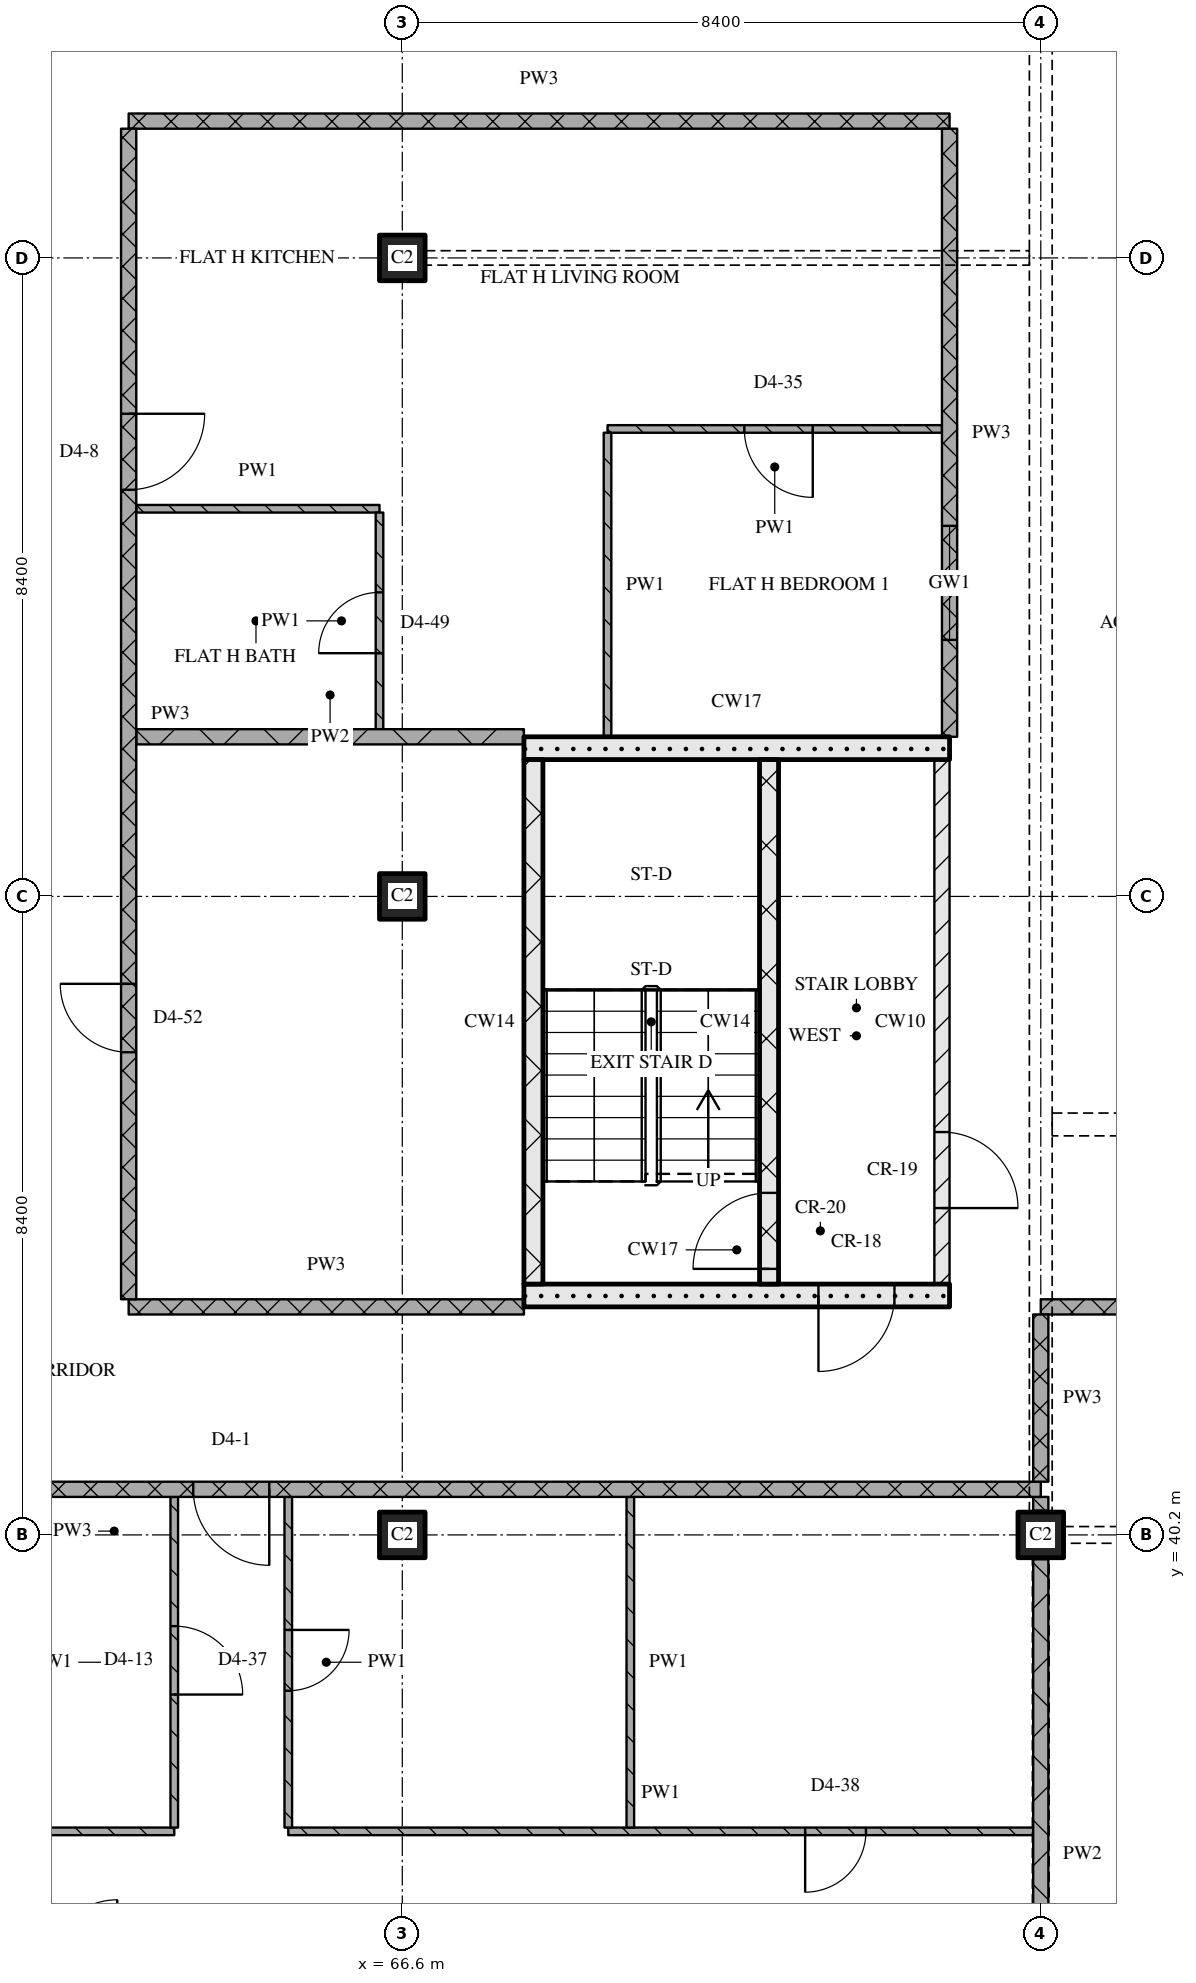
"""IFC4 building model, lengths in metres.
Left out: names, types, materials, properties, quantities, classifications, styles, units other than length and angle.
Written with IfcOpenShell. Run it as: python <this file> out.ifc"""

import sys

from ifc_helpers import new_model, si_unit, direction, frame, frame_2d, origin, origin_2d, place, context, subcontext, project, spatial, rectangle, extrude, element, fill, save


model = new_model("IFC4")
c1 = context("Model", 3, precision=1e-05, world=origin(), true_north=direction((0.0, 1.0)))
c2 = subcontext(c1, "Body", "Model", "MODEL_VIEW")
j1 = project(units=[si_unit("LENGTHUNIT", "METRE"), si_unit("PLANEANGLEUNIT", "RADIAN")], contexts=[c1])
p1 = place(None, origin())
s1 = spatial("IfcSite", under=j1, at=p1, CompositionType="ELEMENT")
p2 = place(p1, origin())
s2 = spatial("IfcBuilding", under=s1, at=p2, CompositionType="ELEMENT")
p3 = place(p2, frame((0.0, 0.0, 237.9)))
s3 = spatial("IfcBuildingStorey", under=s2, at=p3, CompositionType="ELEMENT", Elevation=237.9)
for number, where, z_axis, x_axis in (
    (1, (66.6, 40.2, 0.0), (0.0, 0.0, 1.0), (1.0, 0.0, 0.0)),
    (2, (66.6, 48.6, 0.0), (0.0, 0.0, 1.0), (1.0, 0.0, 0.0)),
    (3, (66.6, 57.0, 0.0), (0.0, 0.0, 1.0), (1.0, 0.0, 0.0)),
    (4, (75.0, 40.2, 0.0), (0.0, 0.0, 1.0), (1.0, 0.0, 0.0)),
):
    element("IfcColumn", number, at=place(p3, frame(where, z_axis=z_axis, x_axis=x_axis)), inside=s3, PredefinedType="COLUMN", context=c2, shape_type="SweptSolid", body=[
        extrude(rectangle(XDim=0.6, YDim=0.6, at=origin_2d()), origin(), (0.0, 0.0, 1.0), 3.6),
    ])
p4 = place(p3, frame((68.2, 43.35, 0.0), z_axis=(0.0, 0.0, 1.0), x_axis=(1.0, 0.0, 0.0)))
e5 = element("IfcWall", 5, at=p4, inside=s3, PredefinedType="SOLIDWALL", context=c2, shape_type="SweptSolid", body=[
    extrude(rectangle(XDim=5.6, YDim=0.3, at=frame_2d((2.8, 0.0))), origin(), (0.0, 0.0, 1.0), 3.32),
])
p5 = place(p4, frame((3.875, 0.0, 0.0)))
e6 = element("IfcOpeningElement", 6, at=p5, cuts=e5, PredefinedType="OPENING", context=c2, shape_type="SweptSolid", body=[
    extrude(rectangle(XDim=1.0, YDim=2.1, at=frame_2d((0.5, 1.05))), frame((0.0, 0.16, 0.0), z_axis=(0.0, -1.0, 0.0), x_axis=(1.0, 0.0, 0.0)), (0.0, 0.0, 1.0), 0.32),
])
p6 = place(p3, frame((68.325, 43.5, 0.0), z_axis=(0.0, 0.0, 1.0), x_axis=(0.0, 1.0, 0.0)))
e7 = element("IfcWall", 7, at=p6, inside=s3, PredefinedType="SOLIDWALL", context=c2, shape_type="SweptSolid", body=[
    extrude(rectangle(XDim=6.9, YDim=0.25, at=frame_2d((3.45, 0.0))), origin(), (0.0, 0.0, 1.0), 3.32),
])
p7 = place(p3, frame((71.425, 43.5, 0.0), z_axis=(0.0, 0.0, 1.0), x_axis=(0.0, 1.0, 0.0)))
e8 = element("IfcWall", 8, at=p7, inside=s3, PredefinedType="SOLIDWALL", context=c2, shape_type="SweptSolid", body=[
    extrude(rectangle(XDim=6.9, YDim=0.25, at=frame_2d((3.45, 0.0))), origin(), (0.0, 0.0, 1.0), 3.32),
])
p8 = place(p7, frame((0.2, 0.0, 0.0)))
e9 = element("IfcOpeningElement", 9, at=p8, cuts=e8, PredefinedType="OPENING", context=c2, shape_type="SweptSolid", body=[
    extrude(rectangle(XDim=1.0, YDim=2.1, at=frame_2d((0.5, 1.05))), frame((0.0, 0.135, 0.0), z_axis=(0.0, -1.0, 0.0), x_axis=(1.0, 0.0, 0.0)), (0.0, 0.0, 1.0), 0.27),
])
p9 = place(p3, frame((73.7, 43.5, 0.0), z_axis=(0.0, 0.0, 1.0), x_axis=(0.0, 1.0, 0.0)))
e10 = element("IfcWall", 10, at=p9, inside=s3, PredefinedType="PARTITIONING", context=c2, shape_type="SweptSolid", body=[
    extrude(rectangle(XDim=6.9, YDim=0.2, at=frame_2d((3.45, 0.0))), origin(), (0.0, 0.0, 1.0), 3.32),
])
p10 = place(p9, frame((1.0, 0.0, 0.0)))
e11 = element("IfcOpeningElement", 11, at=p10, cuts=e10, PredefinedType="OPENING", context=c2, shape_type="SweptSolid", body=[
    extrude(rectangle(XDim=1.0, YDim=2.1, at=frame_2d((0.5, 1.05))), frame((0.0, 0.11, 0.0), z_axis=(0.0, -1.0, 0.0), x_axis=(1.0, 0.0, 0.0)), (0.0, 0.0, 1.0), 0.22),
])
p11 = place(p3, frame((68.2, 50.55, 0.0), z_axis=(0.0, 0.0, 1.0), x_axis=(1.0, 0.0, 0.0)))
e12 = element("IfcWall", 12, at=p11, inside=s3, PredefinedType="SOLIDWALL", context=c2, shape_type="SweptSolid", body=[
    extrude(rectangle(XDim=5.6, YDim=0.3, at=frame_2d((2.8, 0.0))), origin(), (0.0, 0.0, 1.0), 3.32),
])
p12 = place(p3, frame((55.5, 36.3, 0.0), z_axis=(0.0, 0.0, 1.0), x_axis=(1.0, 0.0, 0.0)))
e13 = element("IfcWall", 13, at=p12, inside=s3, PredefinedType="PARTITIONING", context=c2, shape_type="SweptSolid", body=[
    extrude(rectangle(XDim=8.1, YDim=0.1, at=frame_2d((4.05, 0.0))), origin(), (0.0, 0.0, 1.0), 3.32),
])
p13 = place(p3, frame((65.1, 36.3, 0.0), z_axis=(0.0, 0.0, 1.0), x_axis=(1.0, 0.0, 0.0)))
e14 = element("IfcWall", 14, at=p13, inside=s3, PredefinedType="PARTITIONING", context=c2, shape_type="SweptSolid", body=[
    extrude(rectangle(XDim=9.8, YDim=0.1, at=frame_2d((4.9, 0.0))), origin(), (0.0, 0.0, 1.0), 3.32),
])
p14 = place(p13, frame((6.8, 0.0, 0.0)))
e15 = element("IfcOpeningElement", 15, at=p14, cuts=e14, PredefinedType="OPENING", context=c2, shape_type="SweptSolid", body=[
    extrude(rectangle(XDim=0.8, YDim=2.1, at=frame_2d((0.4, 1.05))), frame((0.0, 0.06, 0.0), z_axis=(0.0, -1.0, 0.0), x_axis=(1.0, 0.0, 0.0)), (0.0, 0.0, 1.0), 0.12),
])
p15 = place(p3, frame((75.0, 40.8, 0.0), z_axis=(0.0, 0.0, 1.0), x_axis=(-1.0, 0.0, 0.0)))
e16 = element("IfcWall", 16, at=p15, inside=s3, PredefinedType="PARTITIONING", context=c2, shape_type="SweptSolid", body=[
    extrude(rectangle(XDim=24.38, YDim=0.2, at=frame_2d((12.19, 0.0))), origin(), (0.0, 0.0, 1.0), 3.32),
])
p16 = place(p15, frame((10.15, 0.0, 0.0)))
e17 = element("IfcOpeningElement", 17, at=p16, cuts=e16, PredefinedType="OPENING", context=c2, shape_type="SweptSolid", body=[
    extrude(rectangle(XDim=1.0, YDim=2.1, at=frame_2d((0.5, 1.05))), frame((0.0, 0.11, 0.0), z_axis=(0.0, -1.0, 0.0), x_axis=(1.0, 0.0, 0.0)), (0.0, 0.0, 1.0), 0.22),
])
p17 = place(p3, frame((63.0, 43.2, 0.0), z_axis=(0.0, 0.0, 1.0), x_axis=(1.0, 0.0, 0.0)))
e18 = element("IfcWall", 18, at=p17, inside=s3, PredefinedType="PARTITIONING", context=c2, shape_type="SweptSolid", body=[
    extrude(rectangle(XDim=5.2, YDim=0.2, at=frame_2d((2.6, 0.0))), origin(), (0.0, 0.0, 1.0), 3.32),
])
p18 = place(p3, frame((100.2, 43.2, 0.0), z_axis=(0.0, 0.0, 1.0), x_axis=(-1.0, 0.0, 0.0)))
e19 = element("IfcWall", 19, at=p18, inside=s3, PredefinedType="PARTITIONING", context=c2, shape_type="SweptSolid", body=[
    extrude(rectangle(XDim=25.2, YDim=0.2, at=frame_2d((12.6, 0.0))), origin(), (0.0, 0.0, 1.0), 3.32),
])
p19 = place(p18, frame((9.25, 0.0, 0.0)))
e20 = element("IfcOpeningElement", 20, at=p19, cuts=e19, PredefinedType="OPENING", context=c2, shape_type="SweptSolid", body=[
    extrude(rectangle(XDim=1.0, YDim=2.1, at=frame_2d((0.5, 1.05))), frame((0.0, 0.11, 0.0), z_axis=(0.0, -1.0, 0.0), x_axis=(1.0, 0.0, 0.0)), (0.0, 0.0, 1.0), 0.22),
])
p20 = place(p3, frame((63.1, 50.7, 0.0), z_axis=(0.0, 0.0, 1.0), x_axis=(1.0, 0.0, 0.0)))
e21 = element("IfcWall", 21, at=p20, inside=s3, PredefinedType="PARTITIONING", context=c2, shape_type="SweptSolid", body=[
    extrude(rectangle(XDim=5.1, YDim=0.2, at=frame_2d((2.55, 0.0))), origin(), (0.0, 0.0, 1.0), 3.32),
])
p21 = place(p3, frame((63.1, 53.7, 0.0), z_axis=(0.0, 0.0, 1.0), x_axis=(1.0, 0.0, 0.0)))
e22 = element("IfcWall", 22, at=p21, inside=s3, PredefinedType="PARTITIONING", context=c2, shape_type="SweptSolid", body=[
    extrude(rectangle(XDim=3.2, YDim=0.1, at=frame_2d((1.6, 0.0))), origin(), (0.0, 0.0, 1.0), 3.32),
])
p22 = place(p3, frame((73.7, 54.75, 0.0), z_axis=(0.0, 0.0, 1.0), x_axis=(-1.0, 0.0, 0.0)))
e23 = element("IfcWall", 23, at=p22, inside=s3, PredefinedType="PARTITIONING", context=c2, shape_type="SweptSolid", body=[
    extrude(rectangle(XDim=4.4, YDim=0.1, at=frame_2d((2.2, 0.0))), origin(), (0.0, 0.0, 1.0), 3.32),
])
p23 = place(p22, frame((1.7, 0.0, 0.0)))
e24 = element("IfcOpeningElement", 24, at=p23, cuts=e23, PredefinedType="OPENING", context=c2, shape_type="SweptSolid", body=[
    extrude(rectangle(XDim=0.9, YDim=2.1, at=frame_2d((0.45, 1.05))), frame((0.0, 0.06, 0.0), z_axis=(0.0, -1.0, 0.0), x_axis=(1.0, 0.0, 0.0)), (0.0, 0.0, 1.0), 0.12),
])
p24 = place(p3, frame((63.0, 58.8, 0.0), z_axis=(0.0, 0.0, 1.0), x_axis=(1.0, 0.0, 0.0)))
e25 = element("IfcWall", 25, at=p24, inside=s3, PredefinedType="PARTITIONING", context=c2, shape_type="SweptSolid", body=[
    extrude(rectangle(XDim=10.8, YDim=0.2, at=frame_2d((5.4, 0.0))), origin(), (0.0, 0.0, 1.0), 3.32),
])
p25 = place(p3, frame((63.0, 58.7, 0.0), z_axis=(0.0, 0.0, 1.0), x_axis=(0.0, -1.0, 0.0)))
e26 = element("IfcWall", 26, at=p25, inside=s3, PredefinedType="PARTITIONING", context=c2, shape_type="SweptSolid", body=[
    extrude(rectangle(XDim=15.4, YDim=0.2, at=frame_2d((7.7, 0.0))), origin(), (0.0, 0.0, 1.0), 3.32),
])
p26 = place(p25, frame((3.75, 0.0, 0.0)))
e27 = element("IfcOpeningElement", 27, at=p26, cuts=e26, PredefinedType="OPENING", context=c2, shape_type="SweptSolid", body=[
    extrude(rectangle(XDim=1.0, YDim=2.1, at=frame_2d((0.5, 1.05))), frame((0.0, 0.11, 0.0), z_axis=(0.0, -1.0, 0.0), x_axis=(1.0, 0.0, 0.0)), (0.0, 0.0, 1.0), 0.22),
])
p27 = place(p25, frame((11.25, 0.0, 0.0)))
e28 = element("IfcOpeningElement", 28, at=p27, cuts=e26, PredefinedType="OPENING", context=c2, shape_type="SweptSolid", body=[
    extrude(rectangle(XDim=0.9, YDim=2.1, at=frame_2d((0.45, 1.05))), frame((0.0, 0.11, 0.0), z_axis=(0.0, -1.0, 0.0), x_axis=(1.0, 0.0, 0.0)), (0.0, 0.0, 1.0), 0.22),
])
p28 = place(p3, frame((63.6, 36.35, 0.0), z_axis=(0.0, 0.0, 1.0), x_axis=(0.0, 1.0, 0.0)))
e29 = element("IfcWall", 29, at=p28, inside=s3, PredefinedType="PARTITIONING", context=c2, shape_type="SweptSolid", body=[
    extrude(rectangle(XDim=4.35, YDim=0.1, at=frame_2d((2.175, 0.0))), origin(), (0.0, 0.0, 1.0), 3.32),
])
p29 = place(p28, frame((1.75, 0.0, 0.0)))
e30 = element("IfcOpeningElement", 30, at=p29, cuts=e29, PredefinedType="OPENING", context=c2, shape_type="SweptSolid", body=[
    extrude(rectangle(XDim=0.9, YDim=2.1, at=frame_2d((0.45, 1.05))), frame((0.0, 0.06, 0.0), z_axis=(0.0, -1.0, 0.0), x_axis=(1.0, 0.0, 0.0)), (0.0, 0.0, 1.0), 0.12),
])
p30 = place(p3, frame((65.1, 40.7, 0.0), z_axis=(0.0, 0.0, 1.0), x_axis=(0.0, -1.0, 0.0)))
e31 = element("IfcWall", 31, at=p30, inside=s3, PredefinedType="PARTITIONING", context=c2, shape_type="SweptSolid", body=[
    extrude(rectangle(XDim=4.35, YDim=0.1, at=frame_2d((2.175, 0.0))), origin(), (0.0, 0.0, 1.0), 3.32),
])
p31 = place(p30, frame((1.75, 0.0, 0.0)))
e32 = element("IfcOpeningElement", 32, at=p31, cuts=e31, PredefinedType="OPENING", context=c2, shape_type="SweptSolid", body=[
    extrude(rectangle(XDim=0.8, YDim=2.1, at=frame_2d((0.4, 1.05))), frame((0.0, 0.06, 0.0), z_axis=(0.0, -1.0, 0.0), x_axis=(1.0, 0.0, 0.0)), (0.0, 0.0, 1.0), 0.12),
])
p32 = place(p3, frame((66.3, 50.8, 0.0), z_axis=(0.0, 0.0, 1.0), x_axis=(0.0, 1.0, 0.0)))
e33 = element("IfcWall", 33, at=p32, inside=s3, PredefinedType="PARTITIONING", context=c2, shape_type="SweptSolid", body=[
    extrude(rectangle(XDim=2.85, YDim=0.1, at=frame_2d((1.425, 0.0))), origin(), (0.0, 0.0, 1.0), 3.32),
])
p33 = place(p32, frame((1.0, 0.0, 0.0)))
e34 = element("IfcOpeningElement", 34, at=p33, cuts=e33, PredefinedType="OPENING", context=c2, shape_type="SweptSolid", body=[
    extrude(rectangle(XDim=0.8, YDim=2.1, at=frame_2d((0.4, 1.05))), frame((0.0, 0.06, 0.0), z_axis=(0.0, -1.0, 0.0), x_axis=(1.0, 0.0, 0.0)), (0.0, 0.0, 1.0), 0.12),
])
p34 = place(p3, frame((69.3, 54.7, 0.0), z_axis=(0.0, 0.0, 1.0), x_axis=(0.0, -1.0, 0.0)))
e35 = element("IfcWall", 35, at=p34, inside=s3, PredefinedType="PARTITIONING", context=c2, shape_type="SweptSolid", body=[
    extrude(rectangle(XDim=4.0, YDim=0.1, at=frame_2d((2.0, 0.0))), origin(), (0.0, 0.0, 1.0), 3.32),
])
p35 = place(p3, frame((69.6, 40.7, 0.0), z_axis=(0.0, 0.0, 1.0), x_axis=(0.0, -1.0, 0.0)))
e36 = element("IfcWall", 36, at=p35, inside=s3, PredefinedType="PARTITIONING", context=c2, shape_type="SweptSolid", body=[
    extrude(rectangle(XDim=4.35, YDim=0.1, at=frame_2d((2.175, 0.0))), origin(), (0.0, 0.0, 1.0), 3.32),
])
p36 = place(p3, frame((73.8, 58.7, 0.0), z_axis=(0.0, 0.0, 1.0), x_axis=(0.0, -1.0, 0.0)))
e37 = element("IfcWall", 37, at=p36, inside=s3, PredefinedType="PARTITIONING", context=c2, shape_type="SweptSolid", body=[
    extrude(rectangle(XDim=8.0, YDim=0.2, at=frame_2d((4.0, 0.0))), origin(), (0.0, 0.0, 1.0), 3.32),
])
p37 = place(p36, frame((5.225, 0.0, 0.9)))
e38 = element("IfcOpeningElement", 38, at=p37, cuts=e37, PredefinedType="OPENING", context=c2, shape_type="SweptSolid", body=[
    extrude(rectangle(XDim=1.5, YDim=1.5, at=frame_2d((0.75, 0.75))), frame((0.0, 0.11, 0.0), z_axis=(0.0, -1.0, 0.0), x_axis=(1.0, 0.0, 0.0)), (0.0, 0.0, 1.0), 0.22),
])
p38 = place(p3, frame((75.0, 43.1, 0.0), z_axis=(0.0, 0.0, 1.0), x_axis=(0.0, -1.0, 0.0)))
e39 = element("IfcWall", 39, at=p38, inside=s3, PredefinedType="PARTITIONING", context=c2, shape_type="SweptSolid", body=[
    extrude(rectangle(XDim=2.2, YDim=0.2, at=frame_2d((1.1, 0.0))), origin(), (0.0, 0.0, 1.0), 2.53),
])
p39 = place(p3, frame((75.0, 39.88, 0.0), z_axis=(0.0, 0.0, 1.0), x_axis=(0.0, -1.0, 0.0)))
e40 = element("IfcWall", 40, at=p39, inside=s3, PredefinedType="PARTITIONING", context=c2, shape_type="SweptSolid", body=[
    extrude(rectangle(XDim=7.76, YDim=0.2, at=frame_2d((3.88, 0.0))), origin(), (0.0, 0.0, 1.0), 2.72),
])
p40 = place(p3, frame((75.0, 40.7, 0.0), z_axis=(0.0, 0.0, 1.0), x_axis=(0.0, -1.0, 0.0)))
e41 = element("IfcWall", 41, at=p40, inside=s3, PredefinedType="PARTITIONING", context=c2, shape_type="SweptSolid", body=[
    extrude(rectangle(XDim=0.18, YDim=0.2, at=frame_2d((0.09, 0.0))), origin(), (0.0, 0.0, 1.0), 3.32),
])
p41 = place(p5, origin())
e42 = element("IfcDoor", 42, at=p41, inside=s3, OperationType="SINGLE_SWING_RIGHT", PredefinedType="DOOR", context=c2, shape_type="SweptSolid", body=[
    extrude(rectangle(XDim=1.0, YDim=2.1, at=frame_2d((0.5, 1.05))), frame((0.0, 0.025, 0.0), z_axis=(0.0, -1.0, 0.0), x_axis=(1.0, 0.0, 0.0)), (0.0, 0.0, 1.0), 0.05),
])
fill(e6, e42)
p42 = place(p8, origin())
e43 = element("IfcDoor", 43, at=p42, inside=s3, OperationType="SINGLE_SWING_LEFT", PredefinedType="DOOR", context=c2, shape_type="SweptSolid", body=[
    extrude(rectangle(XDim=1.0, YDim=2.1, at=frame_2d((0.5, 1.05))), frame((0.0, 0.025, 0.0), z_axis=(0.0, -1.0, 0.0), x_axis=(1.0, 0.0, 0.0)), (0.0, 0.0, 1.0), 0.05),
])
fill(e9, e43)
p43 = place(p10, origin())
e44 = element("IfcDoor", 44, at=p43, inside=s3, OperationType="SINGLE_SWING_RIGHT", PredefinedType="DOOR", context=c2, shape_type="SweptSolid", body=[
    extrude(rectangle(XDim=1.0, YDim=2.1, at=frame_2d((0.5, 1.05))), frame((0.0, 0.025, 0.0), z_axis=(0.0, -1.0, 0.0), x_axis=(1.0, 0.0, 0.0)), (0.0, 0.0, 1.0), 0.05),
])
fill(e11, e44)
p44 = place(p14, origin())
e45 = element("IfcDoor", 45, at=p44, inside=s3, OperationType="SINGLE_SWING_RIGHT", PredefinedType="DOOR", context=c2, shape_type="SweptSolid", body=[
    extrude(rectangle(XDim=0.8, YDim=2.1, at=frame_2d((0.4, 1.05))), frame((0.0, 0.025, 0.0), z_axis=(0.0, -1.0, 0.0), x_axis=(1.0, 0.0, 0.0)), (0.0, 0.0, 1.0), 0.05),
])
fill(e15, e45)
p45 = place(p16, origin())
e46 = element("IfcDoor", 46, at=p45, inside=s3, OperationType="SINGLE_SWING_LEFT", PredefinedType="DOOR", context=c2, shape_type="SweptSolid", body=[
    extrude(rectangle(XDim=1.0, YDim=2.1, at=frame_2d((0.5, 1.05))), frame((0.0, 0.025, 0.0), z_axis=(0.0, -1.0, 0.0), x_axis=(1.0, 0.0, 0.0)), (0.0, 0.0, 1.0), 0.05),
])
fill(e17, e46)
p46 = place(p23, origin())
e47 = element("IfcDoor", 47, at=p46, inside=s3, OperationType="SINGLE_SWING_LEFT", PredefinedType="DOOR", context=c2, shape_type="SweptSolid", body=[
    extrude(rectangle(XDim=0.9, YDim=2.1, at=frame_2d((0.45, 1.05))), frame((0.0, 0.025, 0.0), z_axis=(0.0, -1.0, 0.0), x_axis=(1.0, 0.0, 0.0)), (0.0, 0.0, 1.0), 0.05),
])
fill(e24, e47)
p47 = place(p26, origin())
e48 = element("IfcDoor", 48, at=p47, inside=s3, OperationType="SINGLE_SWING_LEFT", PredefinedType="DOOR", context=c2, shape_type="SweptSolid", body=[
    extrude(rectangle(XDim=1.0, YDim=2.1, at=frame_2d((0.5, 1.05))), frame((0.0, 0.025, 0.0), z_axis=(0.0, -1.0, 0.0), x_axis=(1.0, 0.0, 0.0)), (0.0, 0.0, 1.0), 0.05),
])
fill(e27, e48)
p48 = place(p27, origin())
e49 = element("IfcDoor", 49, at=p48, inside=s3, OperationType="SINGLE_SWING_RIGHT", PredefinedType="DOOR", context=c2, shape_type="SweptSolid", body=[
    extrude(rectangle(XDim=0.9, YDim=2.1, at=frame_2d((0.45, 1.05))), frame((0.0, 0.025, 0.0), z_axis=(0.0, -1.0, 0.0), x_axis=(1.0, 0.0, 0.0)), (0.0, 0.0, 1.0), 0.05),
])
fill(e28, e49)
p49 = place(p29, origin())
e50 = element("IfcDoor", 50, at=p49, inside=s3, OperationType="SINGLE_SWING_RIGHT", PredefinedType="DOOR", context=c2, shape_type="SweptSolid", body=[
    extrude(rectangle(XDim=0.9, YDim=2.1, at=frame_2d((0.45, 1.05))), frame((0.0, 0.025, 0.0), z_axis=(0.0, -1.0, 0.0), x_axis=(1.0, 0.0, 0.0)), (0.0, 0.0, 1.0), 0.05),
])
fill(e30, e50)
p50 = place(p31, origin())
e51 = element("IfcDoor", 51, at=p50, inside=s3, OperationType="SINGLE_SWING_LEFT", PredefinedType="DOOR", context=c2, shape_type="SweptSolid", body=[
    extrude(rectangle(XDim=0.8, YDim=2.1, at=frame_2d((0.4, 1.05))), frame((0.0, 0.025, 0.0), z_axis=(0.0, -1.0, 0.0), x_axis=(1.0, 0.0, 0.0)), (0.0, 0.0, 1.0), 0.05),
])
fill(e32, e51)
p51 = place(p33, origin())
e52 = element("IfcDoor", 52, at=p51, inside=s3, OperationType="SINGLE_SWING_LEFT", PredefinedType="DOOR", context=c2, shape_type="SweptSolid", body=[
    extrude(rectangle(XDim=0.8, YDim=2.1, at=frame_2d((0.4, 1.05))), frame((0.0, 0.025, 0.0), z_axis=(0.0, -1.0, 0.0), x_axis=(1.0, 0.0, 0.0)), (0.0, 0.0, 1.0), 0.05),
])
fill(e34, e52)
p52 = place(p37, origin())
e53 = element("IfcWindow", 53, at=p52, inside=s3, PartitioningType="SINGLE_PANEL", PredefinedType="WINDOW", context=c2, shape_type="SweptSolid", body=[
    extrude(rectangle(XDim=1.5, YDim=1.5, at=frame_2d((0.75, 0.75))), frame((0.0, 0.03, 0.0), z_axis=(0.0, -1.0, 0.0), x_axis=(1.0, 0.0, 0.0)), (0.0, 0.0, 1.0), 0.06),
])
fill(e38, e53)
save(model, sys.argv[1])
